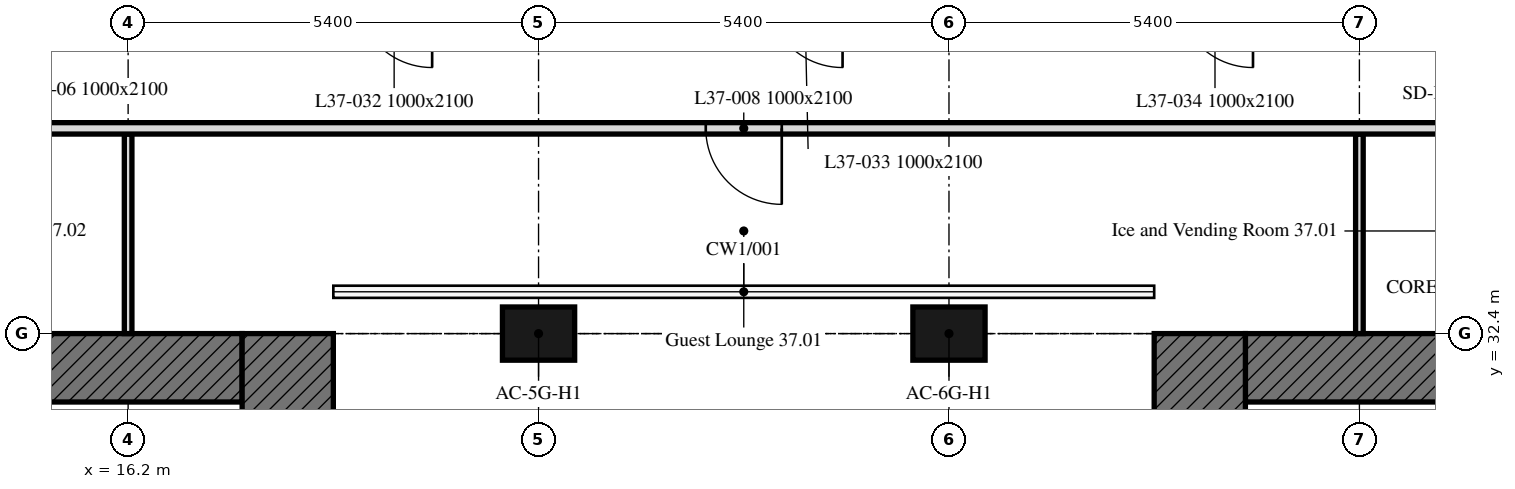
"""IFC4 building model, lengths in metres.
Left out: names, types, materials, properties, quantities, classifications, styles, units other than length and angle.
Written with IfcOpenShell. Run it as: python <this file> out.ifc"""

import sys

from ifc_helpers import new_model, si_unit, direction, frame, frame_2d, origin, origin_2d, place, context, subcontext, project, spatial, rectangle, extrude, element, fill, save


model = new_model("IFC4")
c1 = context("Model", 3, precision=1e-05, world=origin(), true_north=direction((0.0, 1.0)))
c2 = subcontext(c1, "Body", "Model", "MODEL_VIEW")
j1 = project(units=[si_unit("LENGTHUNIT", "METRE"), si_unit("PLANEANGLEUNIT", "RADIAN")], contexts=[c1])
p1 = place(None, origin())
s1 = spatial("IfcSite", under=j1, at=p1, CompositionType="ELEMENT")
p2 = place(p1, origin())
s2 = spatial("IfcBuilding", under=s1, at=p2, CompositionType="ELEMENT")
p3 = place(p2, frame((0.0, 0.0, 159.4)))
s3 = spatial("IfcBuildingStorey", under=s2, at=p3, CompositionType="ELEMENT", Elevation=159.4)
for number, where, z_axis, x_axis in (
    (1, (21.6, 32.4, 0.0), (0.0, 0.0, 1.0), (1.0, 0.0, 0.0)),
    (2, (27.0, 32.4, 0.0), (0.0, 0.0, 1.0), (1.0, 0.0, 0.0)),
):
    element("IfcColumn", number, at=place(p3, frame(where, z_axis=z_axis, x_axis=x_axis)), inside=s3, PredefinedType="COLUMN", context=c2, shape_type="SweptSolid", body=[
        extrude(rectangle(XDim=0.95, YDim=0.7, at=origin_2d()), origin(), (0.0, 0.0, 1.0), 3.0),
    ])
p4 = place(p3, frame((6.6, 31.95, 0.0), z_axis=(0.0, 0.0, 1.0), x_axis=(1.0, 0.0, 0.0)))
e3 = element("IfcWall", 3, at=p4, inside=s3, PredefinedType="SOLIDWALL", context=c2, shape_type="SweptSolid", body=[
    extrude(rectangle(XDim=11.1, YDim=0.9, at=frame_2d((5.55, 0.0))), origin(), (0.0, 0.0, 1.0), 3.0),
])
p5 = place(p4, frame((3.55, 0.0, 0.0)))
e4 = element("IfcOpeningElement", 4, at=p5, cuts=e3, PredefinedType="OPENING", context=c2, shape_type="SweptSolid", body=[
    extrude(rectangle(XDim=2.0, YDim=2.4, at=frame_2d((1.0, 1.2))), frame((0.0, 0.45, 0.0), z_axis=(0.0, -1.0, 0.0), x_axis=(1.0, 0.0, 0.0)), (0.0, 0.0, 1.0), 0.9),
])
p6 = place(p3, frame((18.3, 32.4, 0.0), z_axis=(0.0, 0.0, 1.0), x_axis=(0.0, -1.0, 0.0)))
e5 = element("IfcWall", 5, at=p6, inside=s3, PredefinedType="SOLIDWALL", context=c2, shape_type="SweptSolid", body=[
    extrude(rectangle(XDim=16.2, YDim=1.2, at=frame_2d((8.1, 0.0))), origin(), (0.0, 0.0, 1.0), 3.0),
])
p7 = place(p3, frame((30.9, 31.95, 0.0), z_axis=(0.0, 0.0, 1.0), x_axis=(1.0, 0.0, 0.0)))
e6 = element("IfcWall", 6, at=p7, inside=s3, PredefinedType="SOLIDWALL", context=c2, shape_type="SweptSolid", body=[
    extrude(rectangle(XDim=11.1, YDim=0.9, at=frame_2d((5.55, 0.0))), origin(), (0.0, 0.0, 1.0), 3.0),
])
p8 = place(p7, frame((5.55, 0.0, 0.0)))
e7 = element("IfcOpeningElement", 7, at=p8, cuts=e6, PredefinedType="OPENING", context=c2, shape_type="SweptSolid", body=[
    extrude(rectangle(XDim=2.0, YDim=2.4, at=frame_2d((1.0, 1.2))), frame((0.0, 0.45, 0.0), z_axis=(0.0, -1.0, 0.0), x_axis=(1.0, 0.0, 0.0)), (0.0, 0.0, 1.0), 0.9),
])
p9 = place(p3, frame((30.3, 16.2, 0.0), z_axis=(0.0, 0.0, 1.0), x_axis=(0.0, 1.0, 0.0)))
e8 = element("IfcWall", 8, at=p9, inside=s3, PredefinedType="SOLIDWALL", context=c2, shape_type="SweptSolid", body=[
    extrude(rectangle(XDim=16.2, YDim=1.2, at=frame_2d((8.1, 0.0))), origin(), (0.0, 0.0, 1.0), 3.0),
])
for number, where, z_axis, x_axis in (
    (9, (16.2, 35.025, 0.0), (0.0, 0.0, 1.0), (0.0, -1.0, 0.0)),
    (10, (32.4, 32.4, 0.0), (0.0, 0.0, 1.0), (0.0, 1.0, 0.0)),
):
    element("IfcWall", number, at=place(p3, frame(where, z_axis=z_axis, x_axis=x_axis)), inside=s3, PredefinedType="PARTITIONING", context=c2, shape_type="SweptSolid", body=[
        extrude(rectangle(XDim=2.625, YDim=0.1, at=frame_2d((1.312, 0.0))), origin(), (0.0, 0.0, 1.0), 3.0),
    ])
p10 = place(p3, frame((43.275, 35.1, 0.0), z_axis=(0.0, 0.0, 1.0), x_axis=(-1.0, 0.0, 0.0)))
e11 = element("IfcWall", 11, at=p10, inside=s3, PredefinedType="PARTITIONING", context=c2, shape_type="SweptSolid", body=[
    extrude(rectangle(XDim=37.124, YDim=0.15, at=frame_2d((18.562, 0.0))), origin(), (0.0, 0.0, 1.0), 3.0),
])
p11 = place(p10, frame((18.475, 0.0, 0.0)))
e12 = element("IfcOpeningElement", 12, at=p11, cuts=e11, PredefinedType="OPENING", context=c2, shape_type="SweptSolid", body=[
    extrude(rectangle(XDim=1.0, YDim=2.1, at=frame_2d((0.5, 1.05))), frame((0.0, 0.075, 0.0), z_axis=(0.0, -1.0, 0.0), x_axis=(1.0, 0.0, 0.0)), (0.0, 0.0, 1.0), 0.15),
])
p12 = place(p10, frame((34.095, 0.0, 0.0)))
e13 = element("IfcOpeningElement", 13, at=p12, cuts=e11, PredefinedType="OPENING", context=c2, shape_type="SweptSolid", body=[
    extrude(rectangle(XDim=1.0, YDim=2.1, at=frame_2d((0.5, 1.05))), frame((0.0, 0.075, 0.0), z_axis=(0.0, -1.0, 0.0), x_axis=(1.0, 0.0, 0.0)), (0.0, 0.0, 1.0), 0.15),
])
p13 = place(p10, frame((8.75, 0.0, 0.0)))
e14 = element("IfcOpeningElement", 14, at=p13, cuts=e11, PredefinedType="OPENING", context=c2, shape_type="SweptSolid", body=[
    extrude(rectangle(XDim=1.0, YDim=2.1, at=frame_2d((0.5, 1.05))), frame((0.0, 0.075, 0.0), z_axis=(0.0, -1.0, 0.0), x_axis=(1.0, 0.0, 0.0)), (0.0, 0.0, 1.0), 0.15),
])
p14 = place(p10, frame((1.55, 0.0, 0.0)))
e15 = element("IfcOpeningElement", 15, at=p14, cuts=e11, PredefinedType="OPENING", context=c2, shape_type="SweptSolid", body=[
    extrude(rectangle(XDim=1.0, YDim=2.1, at=frame_2d((0.5, 1.05))), frame((0.0, 0.075, 0.0), z_axis=(0.0, -1.0, 0.0), x_axis=(1.0, 0.0, 0.0)), (0.0, 0.0, 1.0), 0.15),
])
p15 = place(p10, frame((28.2, 0.0, 0.0)))
e16 = element("IfcOpeningElement", 16, at=p15, cuts=e11, PredefinedType="OPENING", context=c2, shape_type="SweptSolid", body=[
    extrude(rectangle(XDim=1.0, YDim=2.1, at=frame_2d((0.5, 1.05))), frame((0.0, 0.075, 0.0), z_axis=(0.0, -1.0, 0.0), x_axis=(1.0, 0.0, 0.0)), (0.0, 0.0, 1.0), 0.15),
])
p16 = place(p10, frame((30.625, 0.0, 0.0)))
e17 = element("IfcOpeningElement", 17, at=p16, cuts=e11, PredefinedType="OPENING", context=c2, shape_type="SweptSolid", body=[
    extrude(rectangle(XDim=1.8, YDim=2.4, at=frame_2d((0.9, 1.2))), frame((0.0, 0.075, 0.0), z_axis=(0.0, -1.0, 0.0), x_axis=(1.0, 0.0, 0.0)), (0.0, 0.0, 1.0), 0.15),
])
p17 = place(p10, frame((5.525, 0.0, 0.0)))
e18 = element("IfcOpeningElement", 18, at=p17, cuts=e11, PredefinedType="OPENING", context=c2, shape_type="SweptSolid", body=[
    extrude(rectangle(XDim=1.8, YDim=2.4, at=frame_2d((0.9, 1.2))), frame((0.0, 0.075, 0.0), z_axis=(0.0, -1.0, 0.0), x_axis=(1.0, 0.0, 0.0)), (0.0, 0.0, 1.0), 0.15),
])
p18 = place(p11, origin())
e19 = element("IfcDoor", 19, at=p18, inside=s3, OperationType="SINGLE_SWING_RIGHT", PredefinedType="DOOR", context=c2, shape_type="SweptSolid", body=[
    extrude(rectangle(XDim=1.0, YDim=2.1, at=frame_2d((0.5, 1.05))), frame((0.0, 0.025, 0.0), z_axis=(0.0, -1.0, 0.0), x_axis=(1.0, 0.0, 0.0)), (0.0, 0.0, 1.0), 0.05),
])
fill(e12, e19)
save(model, sys.argv[1])
